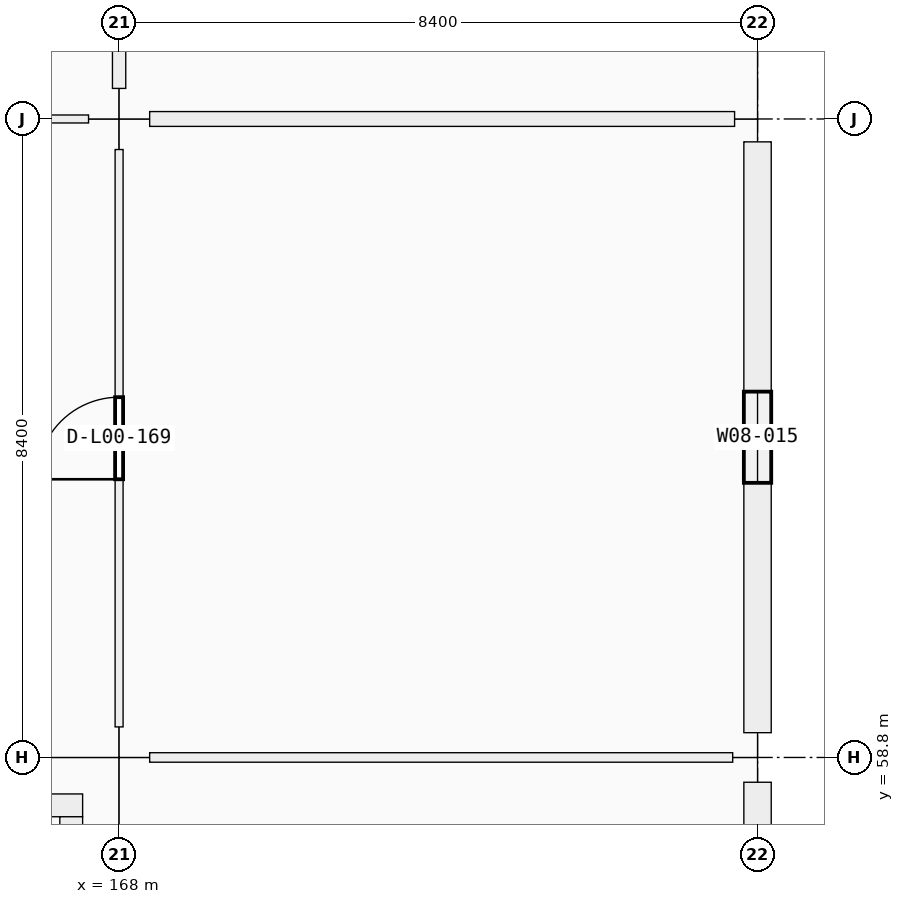
"""IFC4 building model, lengths in metres.
Left out: names, types, materials, properties, quantities, classifications, styles, units other than length and angle.
Written with IfcOpenShell. Run it as: python <this file> out.ifc"""

import sys

from ifc_helpers import new_model, si_unit, direction, frame, frame_2d, origin, origin_2d, place, context, subcontext, project, spatial, rectangle, extrude, element, fill, save


model = new_model("IFC4")
c1 = context("Model", 3, precision=1e-05, world=origin(), true_north=direction((0.0, 1.0)))
c2 = subcontext(c1, "Body", "Model", "MODEL_VIEW")
j1 = project(units=[si_unit("LENGTHUNIT", "METRE"), si_unit("PLANEANGLEUNIT", "RADIAN")], contexts=[c1])
p1 = place(None, origin())
s1 = spatial("IfcSite", under=j1, at=p1, CompositionType="ELEMENT")
p2 = place(p1, origin())
s2 = spatial("IfcBuilding", under=s1, at=p2, CompositionType="ELEMENT")
p3 = place(p2, origin())
s3 = spatial("IfcBuildingStorey", under=s2, at=p3, CompositionType="ELEMENT", Elevation=0.0)
for number, where, z_axis, x_axis in (
    (1, (168.0, 58.8, 0.0), (0.0, 0.0, 1.0), (1.0, 0.0, 0.0)),
    (2, (168.0, 67.2, 0.0), (0.0, 0.0, 1.0), (1.0, 0.0, 0.0)),
):
    element("IfcColumn", number, at=place(p3, frame(where, z_axis=z_axis, x_axis=x_axis)), inside=s3, PredefinedType="COLUMN", context=c2, shape_type="SweptSolid", body=[
        extrude(rectangle(XDim=0.8, YDim=0.8, at=origin_2d()), origin(), (0.0, 0.0, 1.0), 5.76),
    ])
p4 = place(p3, frame((176.4, 58.8, 0.0), z_axis=(0.0, 0.0, 1.0), x_axis=(1.0, 0.0, 0.0)))
e3 = element("IfcColumn", 3, at=p4, inside=s3, PredefinedType="COLUMN", context=c2, shape_type="SweptSolid", body=[
    extrude(rectangle(XDim=0.65, YDim=0.65, at=origin_2d()), origin(), (0.0, 0.0, 1.0), 5.76),
])
p5 = place(p3, frame((176.4, 67.2, 0.0), z_axis=(0.0, 0.0, 1.0), x_axis=(1.0, 0.0, 0.0)))
e4 = element("IfcColumn", 4, at=p5, inside=s3, PredefinedType="COLUMN", context=c2, shape_type="SweptSolid", body=[
    extrude(rectangle(XDim=0.6, YDim=0.6, at=origin_2d()), origin(), (0.0, 0.0, 1.0), 5.76),
])
p6 = place(p3, frame((176.4, 58.474, 0.0), z_axis=(0.0, 0.0, 1.0), x_axis=(0.0, -1.0, 0.0)))
e5 = element("IfcWall", 5, at=p6, inside=s3, PredefinedType="SOLIDWALL", context=c2, shape_type="SweptSolid", body=[
    extrude(rectangle(XDim=7.773, YDim=0.36, at=frame_2d((3.887, 0.0))), origin(), (0.0, 0.0, 1.0), 4.7),
])
p7 = place(p6, frame((2.886, 0.0, 0.0)))
e6 = element("IfcOpeningElement", 6, at=p7, cuts=e5, PredefinedType="OPENING", context=c2, shape_type="SweptSolid", body=[
    extrude(rectangle(XDim=2.0, YDim=2.25, at=frame_2d((1.0, 1.125))), frame((0.0, 0.18, 0.0), z_axis=(0.0, -1.0, 0.0), x_axis=(1.0, 0.0, 0.0)), (0.0, 0.0, 1.0), 0.36),
])
p8 = place(p6, frame((5.624, 0.0, 0.0)))
e7 = element("IfcOpeningElement", 7, at=p8, cuts=e5, PredefinedType="OPENING", context=c2, shape_type="SweptSolid", body=[
    extrude(rectangle(XDim=2.0, YDim=2.25, at=frame_2d((1.0, 1.125))), frame((0.0, 0.18, 0.0), z_axis=(0.0, -1.0, 0.0), x_axis=(1.0, 0.0, 0.0)), (0.0, 0.0, 1.0), 0.36),
])
p9 = place(p3, frame((176.4, 66.899, 0.0), z_axis=(0.0, 0.0, 1.0), x_axis=(0.0, -1.0, 0.0)))
e8 = element("IfcWall", 8, at=p9, inside=s3, PredefinedType="SOLIDWALL", context=c2, shape_type="SweptSolid", body=[
    extrude(rectangle(XDim=7.773, YDim=0.36, at=frame_2d((3.886, 0.0))), origin(), (0.0, 0.0, 1.0), 4.7),
])
p10 = place(p9, frame((3.286, 0.0, 0.9)))
e9 = element("IfcOpeningElement", 9, at=p10, cuts=e8, PredefinedType="OPENING", context=c2, shape_type="SweptSolid", body=[
    extrude(rectangle(XDim=1.2, YDim=2.1, at=frame_2d((0.6, 1.05))), frame((0.0, 0.18, 0.0), z_axis=(0.0, -1.0, 0.0), x_axis=(1.0, 0.0, 0.0)), (0.0, 0.0, 1.0), 0.36),
])
p11 = place(p3, frame((160.08, 58.17, 0.0), z_axis=(0.0, 0.0, 1.0), x_axis=(1.0, 0.0, 0.0)))
e10 = element("IfcWall", 10, at=p11, inside=s3, PredefinedType="SHEAR", context=c2, shape_type="SweptSolid", body=[
    extrude(rectangle(XDim=7.44, YDim=0.3, at=frame_2d((3.72, 0.0))), origin(), (0.0, 0.0, 1.0), 5.76),
])
p12 = place(p3, frame((167.37, 58.02, 0.0), z_axis=(0.0, 0.0, 1.0), x_axis=(0.0, -1.0, 0.0)))
e11 = element("IfcWall", 11, at=p12, inside=s3, PredefinedType="SHEAR", context=c2, shape_type="SweptSolid", body=[
    extrude(rectangle(XDim=6.84, YDim=0.3, at=frame_2d((3.42, 0.0))), origin(), (0.0, 0.0, 1.0), 5.76),
])
p13 = place(p12, frame((5.12, 0.0, 0.0)))
e12 = element("IfcOpeningElement", 12, at=p13, cuts=e11, PredefinedType="OPENING", context=c2, shape_type="SweptSolid", body=[
    extrude(rectangle(XDim=1.5, YDim=2.15, at=frame_2d((0.75, 1.075))), frame((0.0, 0.15, 0.0), z_axis=(0.0, -1.0, 0.0), x_axis=(1.0, 0.0, 0.0)), (0.0, 0.0, 1.0), 0.3),
])
p14 = place(p3, frame((160.002, 67.2, 0.0), z_axis=(0.0, 0.0, 1.0), x_axis=(1.0, 0.0, 0.0)))
e13 = element("IfcWall", 13, at=p14, inside=s3, PredefinedType="PARTITIONING", context=c2, shape_type="SweptSolid", body=[
    extrude(rectangle(XDim=7.596, YDim=0.105, at=frame_2d((3.798, 0.0))), origin(), (0.0, 0.0, 1.0), 3.66),
])
p15 = place(p14, frame((3.273, 0.0, 0.0)))
e14 = element("IfcOpeningElement", 14, at=p15, cuts=e13, PredefinedType="OPENING", context=c2, shape_type="SweptSolid", body=[
    extrude(rectangle(XDim=1.05, YDim=2.12, at=frame_2d((0.525, 1.06))), frame((0.0, 0.052, 0.0), z_axis=(0.0, -1.0, 0.0), x_axis=(1.0, 0.0, 0.0)), (0.0, 0.0, 1.0), 0.105),
])
p16 = place(p3, frame((168.402, 58.8, 0.0), z_axis=(0.0, 0.0, 1.0), x_axis=(1.0, 0.0, 0.0)))
e15 = element("IfcWall", 15, at=p16, inside=s3, PredefinedType="PARTITIONING", context=c2, shape_type="SweptSolid", body=[
    extrude(rectangle(XDim=7.671, YDim=0.125, at=frame_2d((3.835, 0.0))), origin(), (0.0, 0.0, 1.0), 3.66),
])
p17 = place(p16, frame((3.306, 0.0, 0.0)))
e16 = element("IfcOpeningElement", 16, at=p17, cuts=e15, PredefinedType="OPENING", context=c2, shape_type="SweptSolid", body=[
    extrude(rectangle(XDim=1.06, YDim=2.25, at=frame_2d((0.53, 1.125))), frame((0.0, 0.062, 0.0), z_axis=(0.0, -1.0, 0.0), x_axis=(1.0, 0.0, 0.0)), (0.0, 0.0, 1.0), 0.125),
])
p18 = place(p3, frame((168.402, 67.2, 0.0), z_axis=(0.0, 0.0, 1.0), x_axis=(1.0, 0.0, 0.0)))
e17 = element("IfcWall", 17, at=p18, inside=s3, PredefinedType="PARTITIONING", context=c2, shape_type="SweptSolid", body=[
    extrude(rectangle(XDim=7.696, YDim=0.195, at=frame_2d((3.848, 0.0))), origin(), (0.0, 0.0, 1.0), 3.66),
])
p19 = place(p18, frame((3.328, 0.0, 0.0)))
e18 = element("IfcOpeningElement", 18, at=p19, cuts=e17, PredefinedType="OPENING", context=c2, shape_type="SweptSolid", body=[
    extrude(rectangle(XDim=1.04, YDim=2.2, at=frame_2d((0.52, 1.1))), frame((0.0, 0.098, 0.0), z_axis=(0.0, -1.0, 0.0), x_axis=(1.0, 0.0, 0.0)), (0.0, 0.0, 1.0), 0.195),
])
p20 = place(p3, frame((168.0, 59.202, 0.0), z_axis=(0.0, 0.0, 1.0), x_axis=(0.0, 1.0, 0.0)))
e19 = element("IfcWall", 19, at=p20, inside=s3, PredefinedType="PARTITIONING", context=c2, shape_type="SweptSolid", body=[
    extrude(rectangle(XDim=7.596, YDim=0.105, at=frame_2d((3.798, 0.0))), origin(), (0.0, 0.0, 1.0), 3.66),
])
p21 = place(p20, frame((3.258, 0.0, 0.0)))
e20 = element("IfcOpeningElement", 20, at=p21, cuts=e19, PredefinedType="OPENING", context=c2, shape_type="SweptSolid", body=[
    extrude(rectangle(XDim=1.08, YDim=2.25, at=frame_2d((0.54, 1.125))), frame((0.0, 0.052, 0.0), z_axis=(0.0, -1.0, 0.0), x_axis=(1.0, 0.0, 0.0)), (0.0, 0.0, 1.0), 0.105),
])
p22 = place(p3, frame((168.0, 67.602, 0.0), z_axis=(0.0, 0.0, 1.0), x_axis=(0.0, 1.0, 0.0)))
e21 = element("IfcWall", 21, at=p22, inside=s3, PredefinedType="PARTITIONING", context=c2, shape_type="SweptSolid", body=[
    extrude(rectangle(XDim=7.696, YDim=0.175, at=frame_2d((3.848, 0.0))), origin(), (0.0, 0.0, 1.0), 3.66),
])
p23 = place(p22, frame((3.318, 0.0, 0.0)))
e22 = element("IfcOpeningElement", 22, at=p23, cuts=e21, PredefinedType="OPENING", context=c2, shape_type="SweptSolid", body=[
    extrude(rectangle(XDim=1.06, YDim=2.25, at=frame_2d((0.53, 1.125))), frame((0.0, 0.087, 0.0), z_axis=(0.0, -1.0, 0.0), x_axis=(1.0, 0.0, 0.0)), (0.0, 0.0, 1.0), 0.175),
])
p24 = place(p10, origin())
e23 = element("IfcWindow", 23, at=p24, inside=s3, PartitioningType="SINGLE_PANEL", PredefinedType="WINDOW", context=c2, shape_type="SweptSolid", body=[
    extrude(rectangle(XDim=1.2, YDim=2.1, at=frame_2d((0.6, 1.05))), frame((0.0, 0.03, 0.0), z_axis=(0.0, -1.0, 0.0), x_axis=(1.0, 0.0, 0.0)), (0.0, 0.0, 1.0), 0.06),
])
fill(e9, e23)
p25 = place(p17, origin())
e24 = element("IfcDoor", 24, at=p25, inside=s3, OperationType="SINGLE_SWING_LEFT", PredefinedType="DOOR", context=c2, shape_type="SweptSolid", body=[
    extrude(rectangle(XDim=1.06, YDim=2.25, at=frame_2d((0.53, 1.125))), frame((0.0, 0.025, 0.0), z_axis=(0.0, -1.0, 0.0), x_axis=(1.0, 0.0, 0.0)), (0.0, 0.0, 1.0), 0.05),
])
fill(e16, e24)
p26 = place(p19, origin())
e25 = element("IfcDoor", 25, at=p26, inside=s3, OperationType="SINGLE_SWING_RIGHT", PredefinedType="DOOR", context=c2, shape_type="SweptSolid", body=[
    extrude(rectangle(XDim=1.04, YDim=2.2, at=frame_2d((0.52, 1.1))), frame((0.0, 0.025, 0.0), z_axis=(0.0, -1.0, 0.0), x_axis=(1.0, 0.0, 0.0)), (0.0, 0.0, 1.0), 0.05),
])
fill(e18, e25)
p27 = place(p21, origin())
e26 = element("IfcDoor", 26, at=p27, inside=s3, OperationType="SINGLE_SWING_LEFT", PredefinedType="DOOR", context=c2, shape_type="SweptSolid", body=[
    extrude(rectangle(XDim=1.08, YDim=2.25, at=frame_2d((0.54, 1.125))), frame((0.0, 0.025, 0.0), z_axis=(0.0, -1.0, 0.0), x_axis=(1.0, 0.0, 0.0)), (0.0, 0.0, 1.0), 0.05),
])
fill(e20, e26)
save(model, sys.argv[1])
